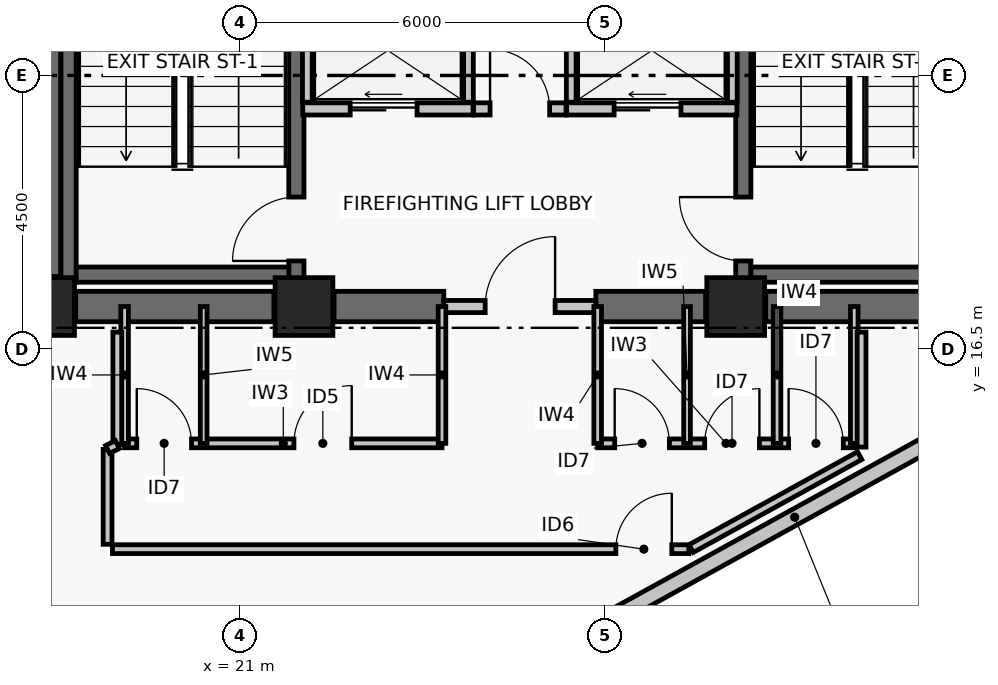
"""IFC4 building model, lengths in metres.
Left out: names, types, materials, properties, quantities, classifications, styles, units other than length and angle.
Written with IfcOpenShell. Run it as: python <this file> out.ifc"""

import sys

from ifc_helpers import new_model, si_unit, direction, frame, frame_2d, origin, origin_2d, place, context, subcontext, project, spatial, rectangle, extrude, element, fill, save


model = new_model("IFC4")
c1 = context("Model", 3, precision=1e-05, world=origin(), true_north=direction((0.0, 1.0)))
c2 = subcontext(c1, "Body", "Model", "MODEL_VIEW")
j1 = project(units=[si_unit("LENGTHUNIT", "METRE"), si_unit("PLANEANGLEUNIT", "RADIAN")], contexts=[c1])
p1 = place(None, origin())
s1 = spatial("IfcSite", under=j1, at=p1, CompositionType="ELEMENT")
p2 = place(p1, origin())
s2 = spatial("IfcBuilding", under=s1, at=p2, CompositionType="ELEMENT")
p3 = place(p2, frame((0.0, 0.0, 172.92)))
s3 = spatial("IfcBuildingStorey", under=s2, at=p3, CompositionType="ELEMENT", Elevation=172.92)
for number, where, z_axis, x_axis in (
    (1, (17.8, 17.2, 0.0), (0.0, 0.0, 1.0), (1.0, 0.0, 0.0)),
    (2, (22.05, 17.2, 0.0), (0.0, 0.0, 1.0), (1.0, 0.0, 0.0)),
    (3, (29.15, 17.2, 0.0), (0.0, 0.0, 1.0), (1.0, 0.0, 0.0)),
):
    element("IfcColumn", number, at=place(p3, frame(where, z_axis=z_axis, x_axis=x_axis)), inside=s3, PredefinedType="COLUMN", context=c2, shape_type="SweptSolid", body=[
        extrude(rectangle(XDim=0.95, YDim=0.95, at=origin_2d()), origin(), (0.0, 0.0, 1.0), 3.72),
    ])
p4 = place(p3, frame((18.295, 17.2, 0.0), z_axis=(0.0, 0.0, 1.0), x_axis=(1.0, 0.0, 0.0)))
e4 = element("IfcWall", 4, at=p4, inside=s3, PredefinedType="SHEAR", context=c2, shape_type="SweptSolid", body=[
    extrude(rectangle(XDim=3.26, YDim=0.5, at=frame_2d((1.63, 0.0))), origin(), (0.0, 0.0, 1.0), 3.5),
])
p5 = place(p3, frame((22.545, 17.2, 0.0), z_axis=(0.0, 0.0, 1.0), x_axis=(1.0, 0.0, 0.0)))
e5 = element("IfcWall", 5, at=p5, inside=s3, PredefinedType="SHEAR", context=c2, shape_type="SweptSolid", body=[
    extrude(rectangle(XDim=1.805, YDim=0.5, at=frame_2d((0.903, 0.0))), origin(), (0.0, 0.0, 1.0), 3.5),
])
p6 = place(p3, frame((26.85, 17.2, 0.0), z_axis=(0.0, 0.0, 1.0), x_axis=(1.0, 0.0, 0.0)))
e6 = element("IfcWall", 6, at=p6, inside=s3, PredefinedType="SHEAR", context=c2, shape_type="SweptSolid", body=[
    extrude(rectangle(XDim=1.805, YDim=0.5, at=frame_2d((0.902, 0.0))), origin(), (0.0, 0.0, 1.0), 3.5),
])
p7 = place(p3, frame((29.645, 17.2, 0.0), z_axis=(0.0, 0.0, 1.0), x_axis=(1.0, 0.0, 0.0)))
e7 = element("IfcWall", 7, at=p7, inside=s3, PredefinedType="SHEAR", context=c2, shape_type="SweptSolid", body=[
    extrude(rectangle(XDim=3.26, YDim=0.5, at=frame_2d((1.63, 0.0))), origin(), (0.0, 0.0, 1.0), 3.5),
])
p8 = place(p3, frame((17.8, 17.695, 0.0), z_axis=(0.0, 0.0, 1.0), x_axis=(0.0, 1.0, 0.0)))
e8 = element("IfcWall", 8, at=p8, inside=s3, PredefinedType="SHEAR", context=c2, shape_type="SweptSolid", body=[
    extrude(rectangle(XDim=8.61, YDim=0.5, at=frame_2d((4.305, 0.0))), origin(), (0.0, 0.0, 1.0), 3.5),
])
p9 = place(p3, frame((18.179, 17.6, 0.0), z_axis=(0.0, 0.0, 1.0), x_axis=(0.0, 1.0, 0.0)))
e9 = element("IfcWall", 9, at=p9, inside=s3, PredefinedType="SHEAR", context=c2, shape_type="SweptSolid", body=[
    extrude(rectangle(XDim=8.8, YDim=0.25, at=frame_2d((4.4, 0.0))), origin(), (0.0, 0.0, 1.0), 3.5),
])
p10 = place(p3, frame((21.925, 17.6, 0.0), z_axis=(0.0, 0.0, 1.0), x_axis=(0.0, 1.0, 0.0)))
e10 = element("IfcWall", 10, at=p10, inside=s3, PredefinedType="SHEAR", context=c2, shape_type="SweptSolid", body=[
    extrude(rectangle(XDim=8.8, YDim=0.25, at=frame_2d((4.4, 0.0))), origin(), (0.0, 0.0, 1.0), 3.5),
])
p11 = place(p10, frame((0.35, 0.0, 0.0)))
e11 = element("IfcOpeningElement", 11, at=p11, cuts=e10, PredefinedType="OPENING", context=c2, shape_type="SweptSolid", body=[
    extrude(rectangle(XDim=1.05, YDim=2.08, at=frame_2d((0.525, 1.04))), frame((0.0, 0.135, 0.0), z_axis=(0.0, -1.0, 0.0), x_axis=(1.0, 0.0, 0.0)), (0.0, 0.0, 1.0), 0.27),
])
p12 = place(p3, frame((18.304, 17.725, 0.0), z_axis=(0.0, 0.0, 1.0), x_axis=(1.0, 0.0, 0.0)))
e12 = element("IfcWall", 12, at=p12, inside=s3, PredefinedType="SHEAR", context=c2, shape_type="SweptSolid", body=[
    extrude(rectangle(XDim=3.496, YDim=0.25, at=frame_2d((1.748, 0.0))), origin(), (0.0, 0.0, 1.0), 3.5),
])
p13 = place(p3, frame((29.275, 17.6, 0.0), z_axis=(0.0, 0.0, 1.0), x_axis=(0.0, 1.0, 0.0)))
e13 = element("IfcWall", 13, at=p13, inside=s3, PredefinedType="SHEAR", context=c2, shape_type="SweptSolid", body=[
    extrude(rectangle(XDim=8.8, YDim=0.25, at=frame_2d((4.4, 0.0))), origin(), (0.0, 0.0, 1.0), 3.5),
])
p14 = place(p13, frame((0.35, 0.0, 0.0)))
e14 = element("IfcOpeningElement", 14, at=p14, cuts=e13, PredefinedType="OPENING", context=c2, shape_type="SweptSolid", body=[
    extrude(rectangle(XDim=1.05, YDim=2.08, at=frame_2d((0.525, 1.04))), frame((0.0, 0.135, 0.0), z_axis=(0.0, -1.0, 0.0), x_axis=(1.0, 0.0, 0.0)), (0.0, 0.0, 1.0), 0.27),
])
p15 = place(p3, frame((29.4, 17.725, 0.0), z_axis=(0.0, 0.0, 1.0), x_axis=(1.0, 0.0, 0.0)))
e15 = element("IfcWall", 15, at=p15, inside=s3, PredefinedType="SHEAR", context=c2, shape_type="SweptSolid", body=[
    extrude(rectangle(XDim=3.496, YDim=0.25, at=frame_2d((1.748, 0.0))), origin(), (0.0, 0.0, 1.0), 3.5),
])
p16 = place(p3, frame((33.195, 15.432, 0.0), z_axis=(0.0, 0.0, 1.0), x_axis=(-0.875663362897, -0.482922017389, 0.0)))
e16 = element("IfcWall", 16, at=p16, inside=s3, PredefinedType="PARTITIONING", context=c2, shape_type="SweptSolid", body=[
    extrude(rectangle(XDim=7.022, YDim=0.26, at=frame_2d((3.511, 0.0))), origin(), (0.0, 0.0, 1.0), 3.5),
])
p17 = place(p3, frame((24.35, 17.2, 0.0), z_axis=(0.0, 0.0, 1.0), x_axis=(1.0, 0.0, 0.0)))
e17 = element("IfcWall", 17, at=p17, inside=s3, PredefinedType="PARTITIONING", context=c2, shape_type="SweptSolid", body=[
    extrude(rectangle(XDim=2.5, YDim=0.2, at=frame_2d((1.25, 0.0))), origin(), (0.0, 0.0, 1.0), 2.63),
])
p18 = place(p17, frame((0.68, 0.0, 0.0)))
e18 = element("IfcOpeningElement", 18, at=p18, cuts=e17, PredefinedType="OPENING", context=c2, shape_type="SweptSolid", body=[
    extrude(rectangle(XDim=1.15, YDim=2.08, at=frame_2d((0.575, 1.04))), frame((0.0, 0.11, 0.0), z_axis=(0.0, -1.0, 0.0), x_axis=(1.0, 0.0, 0.0)), (0.0, 0.0, 1.0), 0.22),
])
p19 = place(p3, frame((24.84, 20.45, 0.0), z_axis=(0.0, 0.0, 1.0), x_axis=(1.0, 0.0, 0.0)))
e19 = element("IfcWall", 19, at=p19, inside=s3, PredefinedType="PARTITIONING", context=c2, shape_type="SweptSolid", body=[
    extrude(rectangle(XDim=1.52, YDim=0.2, at=frame_2d((0.76, 0.0))), origin(), (0.0, 0.0, 1.0), 3.5),
])
p20 = place(p19, frame((0.27, 0.0, 0.0)))
e20 = element("IfcOpeningElement", 20, at=p20, cuts=e19, PredefinedType="OPENING", context=c2, shape_type="SweptSolid", body=[
    extrude(rectangle(XDim=0.98, YDim=2.06, at=frame_2d((0.49, 1.03))), frame((0.0, 0.11, 0.0), z_axis=(0.0, -1.0, 0.0), x_axis=(1.0, 0.0, 0.0)), (0.0, 0.0, 1.0), 0.22),
])
p21 = place(p3, frame((22.03, 20.45, 0.0), z_axis=(0.0, 0.0, 1.0), x_axis=(1.0, 0.0, 0.0)))
e21 = element("IfcWall", 21, at=p21, inside=s3, PredefinedType="PARTITIONING", context=c2, shape_type="SweptSolid", body=[
    extrude(rectangle(XDim=2.8, YDim=0.2, at=frame_2d((1.4, 0.0))), origin(), (0.0, 0.0, 1.0), 3.5),
])
p22 = place(p21, frame((0.78, 0.0, 0.0)))
e22 = element("IfcOpeningElement", 22, at=p22, cuts=e21, PredefinedType="OPENING", context=c2, shape_type="SweptSolid", body=[
    extrude(rectangle(XDim=1.1, YDim=2.08, at=frame_2d((0.55, 1.04))), frame((0.0, 0.11, 0.0), z_axis=(0.0, -1.0, 0.0), x_axis=(1.0, 0.0, 0.0)), (0.0, 0.0, 1.0), 0.22),
])
p23 = place(p3, frame((26.37, 20.45, 0.0), z_axis=(0.0, 0.0, 1.0), x_axis=(1.0, 0.0, 0.0)))
e23 = element("IfcWall", 23, at=p23, inside=s3, PredefinedType="PARTITIONING", context=c2, shape_type="SweptSolid", body=[
    extrude(rectangle(XDim=2.8, YDim=0.2, at=frame_2d((1.4, 0.0))), origin(), (0.0, 0.0, 1.0), 3.5),
])
p24 = place(p23, frame((0.78, 0.0, 0.0)))
e24 = element("IfcOpeningElement", 24, at=p24, cuts=e23, PredefinedType="OPENING", context=c2, shape_type="SweptSolid", body=[
    extrude(rectangle(XDim=1.1, YDim=2.08, at=frame_2d((0.55, 1.04))), frame((0.0, 0.11, 0.0), z_axis=(0.0, -1.0, 0.0), x_axis=(1.0, 0.0, 0.0)), (0.0, 0.0, 1.0), 0.22),
])
for number, where, z_axis, x_axis in (
    (25, (22.105, 20.56, 0.0), (0.0, 0.0, 1.0), (0.0, 1.0, 0.0)),
    (26, (24.755, 20.56, 0.0), (0.0, 0.0, 1.0), (0.0, 1.0, 0.0)),
):
    element("IfcWall", number, at=place(p3, frame(where, z_axis=z_axis, x_axis=x_axis)), inside=s3, PredefinedType="PARTITIONING", context=c2, shape_type="SweptSolid", body=[
        extrude(rectangle(XDim=1.71, YDim=0.16, at=frame_2d((0.855, 0.0))), origin(), (0.0, 0.0, 1.0), 3.5),
    ])
p25 = place(p3, frame((29.095, 20.56, 0.0), z_axis=(0.0, 0.0, 1.0), x_axis=(0.0, 1.0, 0.0)))
e27 = element("IfcWall", 27, at=p25, inside=s3, PredefinedType="PARTITIONING", context=c2, shape_type="SweptSolid", body=[
    extrude(rectangle(XDim=5.45, YDim=0.16, at=frame_2d((2.725, 0.0))), origin(), (0.0, 0.0, 1.0), 3.5),
])
p26 = place(p3, frame((26.445, 20.56, 0.0), z_axis=(0.0, 0.0, 1.0), x_axis=(0.0, 1.0, 0.0)))
e28 = element("IfcWall", 28, at=p26, inside=s3, PredefinedType="PARTITIONING", context=c2, shape_type="SweptSolid", body=[
    extrude(rectangle(XDim=1.71, YDim=0.16, at=frame_2d((0.855, 0.0))), origin(), (0.0, 0.0, 1.0), 3.5),
])
p27 = place(p3, frame((19.1, 14.95, 0.0), z_axis=(0.0, 0.0, 1.0), x_axis=(1.0, 0.0, 0.0)))
e29 = element("IfcWall", 29, at=p27, inside=s3, PredefinedType="PARTITIONING", context=c2, shape_type="SweptSolid", body=[
    extrude(rectangle(XDim=5.22, YDim=0.145, at=frame_2d((2.61, 0.0))), origin(), (0.0, 0.0, 1.0), 2.73),
])
p28 = place(p27, frame((0.2, 0.0, 0.0)))
e30 = element("IfcOpeningElement", 30, at=p28, cuts=e29, PredefinedType="OPENING", context=c2, shape_type="SweptSolid", body=[
    extrude(rectangle(XDim=0.9, YDim=2.02, at=frame_2d((0.45, 1.01))), frame((0.0, 0.083, 0.0), z_axis=(0.0, -1.0, 0.0), x_axis=(1.0, 0.0, 0.0)), (0.0, 0.0, 1.0), 0.165),
])
p29 = place(p27, frame((2.785, 0.0, 0.0)))
e31 = element("IfcOpeningElement", 31, at=p29, cuts=e29, PredefinedType="OPENING", context=c2, shape_type="SweptSolid", body=[
    extrude(rectangle(XDim=0.95, YDim=2.06, at=frame_2d((0.475, 1.03))), frame((0.0, 0.083, 0.0), z_axis=(0.0, -1.0, 0.0), x_axis=(1.0, 0.0, 0.0)), (0.0, 0.0, 1.0), 0.165),
])
p30 = place(p3, frame((26.88, 14.95, 0.0), z_axis=(0.0, 0.0, 1.0), x_axis=(1.0, 0.0, 0.0)))
e32 = element("IfcWall", 32, at=p30, inside=s3, PredefinedType="PARTITIONING", context=c2, shape_type="SweptSolid", body=[
    extrude(rectangle(XDim=4.22, YDim=0.145, at=frame_2d((2.11, 0.0))), origin(), (0.0, 0.0, 1.0), 2.93),
])
p31 = place(p30, frame((0.28, 0.0, 0.0)))
e33 = element("IfcOpeningElement", 33, at=p31, cuts=e32, PredefinedType="OPENING", context=c2, shape_type="SweptSolid", body=[
    extrude(rectangle(XDim=0.9, YDim=2.02, at=frame_2d((0.45, 1.01))), frame((0.0, 0.083, 0.0), z_axis=(0.0, -1.0, 0.0), x_axis=(1.0, 0.0, 0.0)), (0.0, 0.0, 1.0), 0.165),
])
p32 = place(p30, frame((1.76, 0.0, 0.0)))
e34 = element("IfcOpeningElement", 34, at=p32, cuts=e32, PredefinedType="OPENING", context=c2, shape_type="SweptSolid", body=[
    extrude(rectangle(XDim=0.9, YDim=2.02, at=frame_2d((0.45, 1.01))), frame((0.0, 0.083, 0.0), z_axis=(0.0, -1.0, 0.0), x_axis=(1.0, 0.0, 0.0)), (0.0, 0.0, 1.0), 0.165),
])
p33 = place(p30, frame((3.14, 0.0, 0.0)))
e35 = element("IfcOpeningElement", 35, at=p33, cuts=e32, PredefinedType="OPENING", context=c2, shape_type="SweptSolid", body=[
    extrude(rectangle(XDim=0.9, YDim=2.02, at=frame_2d((0.45, 1.01))), frame((0.0, 0.083, 0.0), z_axis=(0.0, -1.0, 0.0), x_axis=(1.0, 0.0, 0.0)), (0.0, 0.0, 1.0), 0.165),
])
p34 = place(p3, frame((19.1, 14.95, 0.0), z_axis=(0.0, 0.0, 1.0), x_axis=(0.0, 1.0, 0.0)))
e36 = element("IfcWall", 36, at=p34, inside=s3, PredefinedType="PARTITIONING", context=c2, shape_type="SweptSolid", body=[
    extrude(rectangle(XDim=2.25, YDim=0.125, at=frame_2d((1.125, 0.0))), origin(), (0.0, 0.0, 1.0), 2.63),
])
p35 = place(p3, frame((20.4, 14.95, 0.0), z_axis=(0.0, 0.0, 1.0), x_axis=(0.0, 1.0, 0.0)))
e37 = element("IfcWall", 37, at=p35, inside=s3, PredefinedType="PARTITIONING", context=c2, shape_type="SweptSolid", body=[
    extrude(rectangle(XDim=2.25, YDim=0.11, at=frame_2d((1.125, 0.0))), origin(), (0.0, 0.0, 1.0), 2.63),
])
for number, where, z_axis, x_axis in (
    (38, (24.32, 14.95, 0.0), (0.0, 0.0, 1.0), (0.0, 1.0, 0.0)),
    (39, (26.88, 14.95, 0.0), (0.0, 0.0, 1.0), (0.0, 1.0, 0.0)),
):
    element("IfcWall", number, at=place(p3, frame(where, z_axis=z_axis, x_axis=x_axis)), inside=s3, PredefinedType="PARTITIONING", context=c2, shape_type="SweptSolid", body=[
        extrude(rectangle(XDim=2.25, YDim=0.125, at=frame_2d((1.125, 0.0))), origin(), (0.0, 0.0, 1.0), 2.63),
    ])
p36 = place(p3, frame((28.35, 14.95, 0.0), z_axis=(0.0, 0.0, 1.0), x_axis=(0.0, 1.0, 0.0)))
e40 = element("IfcWall", 40, at=p36, inside=s3, PredefinedType="PARTITIONING", context=c2, shape_type="SweptSolid", body=[
    extrude(rectangle(XDim=2.25, YDim=0.11, at=frame_2d((1.125, 0.0))), origin(), (0.0, 0.0, 1.0), 2.63),
])
for number, where, z_axis, x_axis in (
    (41, (29.83, 14.95, 0.0), (0.0, 0.0, 1.0), (0.0, 1.0, 0.0)),
    (42, (31.1, 14.95, 0.0), (0.0, 0.0, 1.0), (0.0, 1.0, 0.0)),
):
    element("IfcWall", number, at=place(p3, frame(where, z_axis=z_axis, x_axis=x_axis)), inside=s3, PredefinedType="PARTITIONING", context=c2, shape_type="SweptSolid", body=[
        extrude(rectangle(XDim=2.25, YDim=0.125, at=frame_2d((1.125, 0.0))), origin(), (0.0, 0.0, 1.0), 2.63),
    ])
p37 = place(p3, frame((18.98, 16.78, 0.0), z_axis=(0.0, 0.0, 1.0), x_axis=(0.0, -1.0, 0.0)))
e43 = element("IfcWall", 43, at=p37, inside=s3, PredefinedType="PARTITIONING", context=c2, shape_type="SweptSolid", body=[
    extrude(rectangle(XDim=1.85, YDim=0.145, at=frame_2d((0.925, 0.0))), origin(), (0.0, 0.0, 1.0), 2.63),
])
p38 = place(p3, frame((18.82, 14.85, 0.0), z_axis=(0.0, 0.0, 1.0), x_axis=(0.0, -1.0, 0.0)))
e44 = element("IfcWall", 44, at=p38, inside=s3, PredefinedType="PARTITIONING", context=c2, shape_type="SweptSolid", body=[
    extrude(rectangle(XDim=1.56, YDim=0.145, at=frame_2d((0.78, 0.0))), origin(), (0.0, 0.0, 1.0), 3.08),
])
p39 = place(p3, frame((18.9, 13.21, 0.0), z_axis=(0.0, 0.0, 1.0), x_axis=(1.0, 0.0, 0.0)))
e45 = element("IfcWall", 45, at=p39, inside=s3, PredefinedType="PARTITIONING", context=c2, shape_type="SweptSolid", body=[
    extrude(rectangle(XDim=9.479, YDim=0.145, at=frame_2d((4.74, 0.0))), origin(), (0.0, 0.0, 1.0), 2.73),
])
p40 = place(p39, frame((8.279, 0.0, 0.0)))
e46 = element("IfcOpeningElement", 46, at=p40, cuts=e45, PredefinedType="OPENING", context=c2, shape_type="SweptSolid", body=[
    extrude(rectangle(XDim=0.92, YDim=2.05, at=frame_2d((0.46, 1.025))), frame((0.0, 0.083, 0.0), z_axis=(0.0, -1.0, 0.0), x_axis=(1.0, 0.0, 0.0)), (0.0, 0.0, 1.0), 0.165),
])
p41 = place(p3, frame((28.418, 13.22, 0.0), z_axis=(0.0, 0.0, 1.0), x_axis=(0.875692450227, 0.48286927073, 0.0)))
e47 = element("IfcWall", 47, at=p41, inside=s3, PredefinedType="PARTITIONING", context=c2, shape_type="SweptSolid", body=[
    extrude(rectangle(XDim=3.164, YDim=0.145, at=frame_2d((1.582, 0.0))), origin(), (0.0, 0.0, 1.0), 3.5),
])
p42 = place(p3, frame((31.22, 14.889, 0.0), z_axis=(0.0, 0.0, 1.0), x_axis=(0.0, 1.0, 0.0)))
e48 = element("IfcWall", 48, at=p42, inside=s3, PredefinedType="PARTITIONING", context=c2, shape_type="SweptSolid", body=[
    extrude(rectangle(XDim=1.891, YDim=0.145, at=frame_2d((0.946, 0.0))), origin(), (0.0, 0.0, 1.0), 2.63),
])
p43 = place(p3, frame((18.82, 14.85, 0.0), z_axis=(0.0, 0.0, 1.0), x_axis=(0.89470021502, 0.446667130247, 0.0)))
e49 = element("IfcWall", 49, at=p43, inside=s3, PredefinedType="PARTITIONING", context=c2, shape_type="SweptSolid", body=[
    extrude(rectangle(XDim=0.179, YDim=0.145, at=frame_2d((0.089, 0.0))), origin(), (0.0, 0.0, 1.0), 3.5),
])
p44 = place(p11, origin())
e50 = element("IfcDoor", 50, at=p44, inside=s3, OperationType="SINGLE_SWING_LEFT", PredefinedType="DOOR", context=c2, shape_type="SweptSolid", body=[
    extrude(rectangle(XDim=1.05, YDim=2.08, at=frame_2d((0.525, 1.04))), frame((0.0, 0.025, 0.0), z_axis=(0.0, -1.0, 0.0), x_axis=(1.0, 0.0, 0.0)), (0.0, 0.0, 1.0), 0.05),
])
fill(e11, e50)
p45 = place(p14, origin())
e51 = element("IfcDoor", 51, at=p45, inside=s3, OperationType="SINGLE_SWING_RIGHT", PredefinedType="DOOR", context=c2, shape_type="SweptSolid", body=[
    extrude(rectangle(XDim=1.05, YDim=2.08, at=frame_2d((0.525, 1.04))), frame((0.0, 0.025, 0.0), z_axis=(0.0, -1.0, 0.0), x_axis=(1.0, 0.0, 0.0)), (0.0, 0.0, 1.0), 0.05),
])
fill(e14, e51)
p46 = place(p18, origin())
e52 = element("IfcDoor", 52, at=p46, inside=s3, OperationType="SINGLE_SWING_RIGHT", PredefinedType="DOOR", context=c2, shape_type="SweptSolid", body=[
    extrude(rectangle(XDim=1.15, YDim=2.08, at=frame_2d((0.575, 1.04))), frame((0.0, 0.025, 0.0), z_axis=(0.0, -1.0, 0.0), x_axis=(1.0, 0.0, 0.0)), (0.0, 0.0, 1.0), 0.05),
])
fill(e18, e52)
p47 = place(p20, origin())
e53 = element("IfcDoor", 53, at=p47, inside=s3, OperationType="SINGLE_SWING_LEFT", PredefinedType="DOOR", context=c2, shape_type="SweptSolid", body=[
    extrude(rectangle(XDim=0.98, YDim=2.06, at=frame_2d((0.49, 1.03))), frame((0.0, 0.025, 0.0), z_axis=(0.0, -1.0, 0.0), x_axis=(1.0, 0.0, 0.0)), (0.0, 0.0, 1.0), 0.05),
])
fill(e20, e53)
p48 = place(p22, origin())
e54 = element("IfcDoor", 54, at=p48, inside=s3, OperationType="DOUBLE_DOOR_SLIDING", PredefinedType="DOOR", context=c2, shape_type="SweptSolid", body=[
    extrude(rectangle(XDim=1.1, YDim=2.08, at=frame_2d((0.55, 1.04))), frame((0.0, 0.025, 0.0), z_axis=(0.0, -1.0, 0.0), x_axis=(1.0, 0.0, 0.0)), (0.0, 0.0, 1.0), 0.05),
])
fill(e22, e54)
p49 = place(p24, origin())
e55 = element("IfcDoor", 55, at=p49, inside=s3, OperationType="DOUBLE_DOOR_SLIDING", PredefinedType="DOOR", context=c2, shape_type="SweptSolid", body=[
    extrude(rectangle(XDim=1.1, YDim=2.08, at=frame_2d((0.55, 1.04))), frame((0.0, 0.025, 0.0), z_axis=(0.0, -1.0, 0.0), x_axis=(1.0, 0.0, 0.0)), (0.0, 0.0, 1.0), 0.05),
])
fill(e24, e55)
p50 = place(p28, origin())
e56 = element("IfcDoor", 56, at=p50, inside=s3, OperationType="SINGLE_SWING_LEFT", PredefinedType="DOOR", context=c2, shape_type="SweptSolid", body=[
    extrude(rectangle(XDim=0.9, YDim=2.02, at=frame_2d((0.45, 1.01))), frame((0.0, 0.025, 0.0), z_axis=(0.0, -1.0, 0.0), x_axis=(1.0, 0.0, 0.0)), (0.0, 0.0, 1.0), 0.05),
])
fill(e30, e56)
p51 = place(p29, origin())
e57 = element("IfcDoor", 57, at=p51, inside=s3, OperationType="SINGLE_SWING_RIGHT", PredefinedType="DOOR", context=c2, shape_type="SweptSolid", body=[
    extrude(rectangle(XDim=0.95, YDim=2.06, at=frame_2d((0.475, 1.03))), frame((0.0, 0.025, 0.0), z_axis=(0.0, -1.0, 0.0), x_axis=(1.0, 0.0, 0.0)), (0.0, 0.0, 1.0), 0.05),
])
fill(e31, e57)
p52 = place(p31, origin())
e58 = element("IfcDoor", 58, at=p52, inside=s3, OperationType="SINGLE_SWING_LEFT", PredefinedType="DOOR", context=c2, shape_type="SweptSolid", body=[
    extrude(rectangle(XDim=0.9, YDim=2.02, at=frame_2d((0.45, 1.01))), frame((0.0, 0.025, 0.0), z_axis=(0.0, -1.0, 0.0), x_axis=(1.0, 0.0, 0.0)), (0.0, 0.0, 1.0), 0.05),
])
fill(e33, e58)
p53 = place(p32, origin())
e59 = element("IfcDoor", 59, at=p53, inside=s3, OperationType="SINGLE_SWING_RIGHT", PredefinedType="DOOR", context=c2, shape_type="SweptSolid", body=[
    extrude(rectangle(XDim=0.9, YDim=2.02, at=frame_2d((0.45, 1.01))), frame((0.0, 0.025, 0.0), z_axis=(0.0, -1.0, 0.0), x_axis=(1.0, 0.0, 0.0)), (0.0, 0.0, 1.0), 0.05),
])
fill(e34, e59)
p54 = place(p33, origin())
e60 = element("IfcDoor", 60, at=p54, inside=s3, OperationType="SINGLE_SWING_LEFT", PredefinedType="DOOR", context=c2, shape_type="SweptSolid", body=[
    extrude(rectangle(XDim=0.9, YDim=2.02, at=frame_2d((0.45, 1.01))), frame((0.0, 0.025, 0.0), z_axis=(0.0, -1.0, 0.0), x_axis=(1.0, 0.0, 0.0)), (0.0, 0.0, 1.0), 0.05),
])
fill(e35, e60)
p55 = place(p40, origin())
e61 = element("IfcDoor", 61, at=p55, inside=s3, OperationType="SINGLE_SWING_RIGHT", PredefinedType="DOOR", context=c2, shape_type="SweptSolid", body=[
    extrude(rectangle(XDim=0.92, YDim=2.05, at=frame_2d((0.46, 1.025))), frame((0.0, 0.025, 0.0), z_axis=(0.0, -1.0, 0.0), x_axis=(1.0, 0.0, 0.0)), (0.0, 0.0, 1.0), 0.05),
])
fill(e46, e61)
save(model, sys.argv[1])
